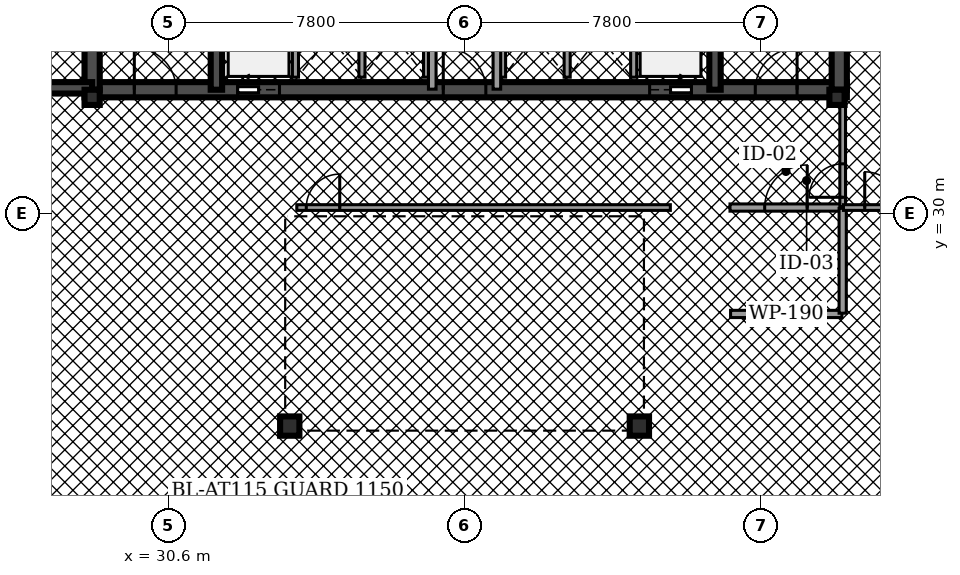
"""IFC4 building model, lengths in metres.
Left out: names, types, materials, properties, quantities, classifications, styles, units other than length and angle.
Written with IfcOpenShell. Run it as: python <this file> out.ifc"""

import sys

from ifc_helpers import new_model, si_unit, direction, frame, frame_2d, origin, origin_2d, place, context, subcontext, project, spatial, rectangle, hollow_rectangle, hollow_circle, extrude, element, fill, save


model = new_model("IFC4")
c1 = context("Model", 3, precision=1e-05, world=origin(), true_north=direction((0.0, 1.0)))
c2 = subcontext(c1, "Body", "Model", "MODEL_VIEW")
j1 = project(units=[si_unit("LENGTHUNIT", "METRE"), si_unit("PLANEANGLEUNIT", "RADIAN")], contexts=[c1])
p1 = place(None, origin())
s1 = spatial("IfcSite", under=j1, at=p1, CompositionType="ELEMENT")
p2 = place(p1, origin())
s2 = spatial("IfcBuilding", under=s1, at=p2, CompositionType="ELEMENT")
p3 = place(p2, frame((0.0, 0.0, 22.78)))
s3 = spatial("IfcBuildingStorey", under=s2, at=p3, CompositionType="ELEMENT", Elevation=22.78)
p4 = place(p3, frame((28.4, 33.25, 0.0), z_axis=(0.0, 0.0, 1.0), x_axis=(1.0, 0.0, 0.0)))
e1 = element("IfcWall", 1, at=p4, inside=s3, PredefinedType="SHEAR", context=c2, shape_type="SweptSolid", body=[
    extrude(rectangle(XDim=20.06, YDim=0.4, at=frame_2d((10.03, 0.0))), origin(), (0.0, 0.0, 1.0), 4.5),
])
p5 = place(p4, frame((4.03, 0.0, 0.0)))
e2 = element("IfcOpeningElement", 2, at=p5, cuts=e1, PredefinedType="OPENING", context=c2, shape_type="SweptSolid", body=[
    extrude(rectangle(XDim=1.1, YDim=2.15, at=frame_2d((0.55, 1.075))), frame((0.0, 0.21, 0.0), z_axis=(0.0, -1.0, 0.0), x_axis=(1.0, 0.0, 0.0)), (0.0, 0.0, 1.0), 0.42),
])
p6 = place(p4, frame((14.87, 0.0, 0.0)))
e3 = element("IfcOpeningElement", 3, at=p6, cuts=e1, PredefinedType="OPENING", context=c2, shape_type="SweptSolid", body=[
    extrude(rectangle(XDim=1.1, YDim=2.15, at=frame_2d((0.55, 1.075))), frame((0.0, 0.21, 0.0), z_axis=(0.0, -1.0, 0.0), x_axis=(1.0, 0.0, 0.0)), (0.0, 0.0, 1.0), 0.42),
])
p7 = place(p4, frame((1.31, 0.0, 0.0)))
e4 = element("IfcOpeningElement", 4, at=p7, cuts=e1, PredefinedType="OPENING", context=c2, shape_type="SweptSolid", body=[
    extrude(rectangle(XDim=1.1, YDim=2.2, at=frame_2d((0.55, 1.1))), frame((0.0, 0.21, 0.0), z_axis=(0.0, -1.0, 0.0), x_axis=(1.0, 0.0, 0.0)), (0.0, 0.0, 1.0), 0.42),
])
p8 = place(p4, frame((9.44, 0.0, 0.0)))
e5 = element("IfcOpeningElement", 5, at=p8, cuts=e1, PredefinedType="OPENING", context=c2, shape_type="SweptSolid", body=[
    extrude(rectangle(XDim=1.12, YDim=2.05, at=frame_2d((0.56, 1.025))), frame((0.0, 0.21, 0.0), z_axis=(0.0, -1.0, 0.0), x_axis=(1.0, 0.0, 0.0)), (0.0, 0.0, 1.0), 0.42),
])
p9 = place(p4, frame((17.65, 0.0, 0.0)))
e6 = element("IfcOpeningElement", 6, at=p9, cuts=e1, PredefinedType="OPENING", context=c2, shape_type="SweptSolid", body=[
    extrude(rectangle(XDim=1.1, YDim=2.2, at=frame_2d((0.55, 1.1))), frame((0.0, 0.21, 0.0), z_axis=(0.0, -1.0, 0.0), x_axis=(1.0, 0.0, 0.0)), (0.0, 0.0, 1.0), 0.42),
])
p10 = place(p3, frame((28.6, 33.25, 0.0), z_axis=(0.0, 0.0, 1.0), x_axis=(0.0, 1.0, 0.0)))
e7 = element("IfcWall", 7, at=p10, inside=s3, PredefinedType="SHEAR", context=c2, shape_type="SweptSolid", body=[
    extrude(rectangle(XDim=10.2, YDim=0.4, at=frame_2d((5.1, 0.0))), origin(), (0.0, 0.0, 1.0), 4.5),
])
for number, where, z_axis, x_axis in (
    (8, (31.87, 33.25, 0.0), (0.0, 0.0, 1.0), (0.0, 1.0, 0.0)),
    (9, (44.99, 33.25, 0.0), (0.0, 0.0, 1.0), (0.0, 1.0, 0.0)),
):
    element("IfcWall", number, at=place(p3, frame(where, z_axis=z_axis, x_axis=x_axis)), inside=s3, PredefinedType="SHEAR", context=c2, shape_type="SweptSolid", body=[
        extrude(rectangle(XDim=10.2, YDim=0.3, at=frame_2d((5.1, 0.0))), origin(), (0.0, 0.0, 1.0), 4.5),
    ])
p11 = place(p3, frame((48.26, 33.25, 0.0), z_axis=(0.0, 0.0, 1.0), x_axis=(0.0, 1.0, 0.0)))
e10 = element("IfcWall", 10, at=p11, inside=s3, PredefinedType="SHEAR", context=c2, shape_type="SweptSolid", body=[
    extrude(rectangle(XDim=10.2, YDim=0.4, at=frame_2d((5.1, 0.0))), origin(), (0.0, 0.0, 1.0), 4.5),
])
p12 = place(p3, frame((25.08, 33.3, 0.0), z_axis=(0.0, 0.0, 1.0), x_axis=(1.0, 0.0, 0.0)))
e11 = element("IfcWall", 11, at=p12, inside=s3, PredefinedType="SHEAR", context=c2, shape_type="SweptSolid", body=[
    extrude(rectangle(XDim=3.52, YDim=0.3, at=frame_2d((1.76, 0.0))), origin(), (0.0, 0.0, 1.0), 4.5),
])
p13 = place(p12, frame((1.335, 0.0, 0.0)))
e12 = element("IfcOpeningElement", 12, at=p13, cuts=e11, PredefinedType="OPENING", context=c2, shape_type="SweptSolid", body=[
    extrude(rectangle(XDim=0.95, YDim=2.2, at=frame_2d((0.475, 1.1))), frame((0.0, 0.16, 0.0), z_axis=(0.0, -1.0, 0.0), x_axis=(1.0, 0.0, 0.0)), (0.0, 0.0, 1.0), 0.32),
])
for number, where, z_axis, x_axis in (
    (13, (28.6, 33.05, 0.0), (0.0, 0.0, 1.0), (1.0, 0.0, 0.0)),
    (14, (48.2, 33.05, 0.0), (0.0, 0.0, 1.0), (1.0, 0.0, 0.0)),
):
    element("IfcColumn", number, at=place(p3, frame(where, z_axis=z_axis, x_axis=x_axis)), inside=s3, PredefinedType="PILASTER", context=c2, shape_type="SweptSolid", body=[
        extrude(hollow_rectangle(XDim=0.4, YDim=0.4, WallThickness=0.02, at=origin_2d()), origin(), (0.0, 0.0, 1.0), 4.5),
    ])
for number, where, z_axis, x_axis in (
    (15, (33.8, 24.4, 0.0), (0.0, 0.0, 1.0), (1.0, 0.0, 0.0)),
    (16, (43.0, 24.4, 0.0), (0.0, 0.0, 1.0), (1.0, 0.0, 0.0)),
):
    element("IfcColumn", number, at=place(p3, frame(where, z_axis=z_axis, x_axis=x_axis)), inside=s3, PredefinedType="COLUMN", context=c2, shape_type="SweptSolid", body=[
        extrude(hollow_circle(Radius=0.254, WallThickness=0.02, at=origin_2d()), origin(), (0.0, 0.0, 1.0), 4.5),
    ])
p14 = place(p3, frame((16.0, 33.568, 0.0), z_axis=(0.0, 0.0, 1.0), x_axis=(0.603864446157, 0.797087028289, 0.0)))
e17 = element("IfcWall", 17, at=p14, inside=s3, PredefinedType="STANDARD", context=c2, shape_type="SweptSolid", body=[
    extrude(rectangle(XDim=20.866, YDim=0.26, at=frame_2d((10.433, 0.0))), origin(), (0.0, 0.0, 1.0), 3.65),
])
p15 = place(p14, frame((2.65, 0.0, 0.0)))
e18 = element("IfcOpeningElement", 18, at=p15, cuts=e17, PredefinedType="OPENING", context=c2, shape_type="SweptSolid", body=[
    extrude(rectangle(XDim=1.8, YDim=2.2, at=frame_2d((0.9, 1.1))), frame((0.0, 0.14, 0.0), z_axis=(0.0, -1.0, 0.0), x_axis=(1.0, 0.0, 0.0)), (0.0, 0.0, 1.0), 0.28),
])
p16 = place(p14, frame((5.3, 0.0, 0.75)))
e19 = element("IfcOpeningElement", 19, at=p16, cuts=e17, PredefinedType="OPENING", context=c2, shape_type="SweptSolid", body=[
    extrude(rectangle(XDim=2.1, YDim=2.2, at=frame_2d((1.05, 1.1))), frame((0.0, 0.14, 0.0), z_axis=(0.0, -1.0, 0.0), x_axis=(1.0, 0.0, 0.0)), (0.0, 0.0, 1.0), 0.28),
])
for number, where, z_axis, x_axis in (
    (20, (33.95, 33.58, 0.0), (0.0, 0.0, 1.0), (0.0, 1.0, 0.0)),
    (21, (42.85, 33.58, 0.0), (0.0, 0.0, 1.0), (0.0, 1.0, 0.0)),
):
    element("IfcWall", number, at=place(p3, frame(where, z_axis=z_axis, x_axis=x_axis)), inside=s3, PredefinedType="SOLIDWALL", context=c2, shape_type="SweptSolid", body=[
        extrude(rectangle(XDim=2.45, YDim=0.16, at=frame_2d((1.225, 0.0))), origin(), (0.0, 0.0, 1.0), 3.472),
    ])
for number, where, z_axis, x_axis in (
    (22, (35.7, 33.58, 0.0), (0.0, 0.0, 1.0), (0.0, 1.0, 0.0)),
    (23, (37.4, 33.58, 0.0), (0.0, 0.0, 1.0), (0.0, 1.0, 0.0)),
    (24, (39.4, 33.58, 0.0), (0.0, 0.0, 1.0), (0.0, 1.0, 0.0)),
    (25, (41.1, 33.58, 0.0), (0.0, 0.0, 1.0), (0.0, 1.0, 0.0)),
):
    element("IfcWall", number, at=place(p3, frame(where, z_axis=z_axis, x_axis=x_axis)), inside=s3, PredefinedType="SOLIDWALL", context=c2, shape_type="SweptSolid", body=[
        extrude(rectangle(XDim=2.25, YDim=0.16, at=frame_2d((1.125, 0.0))), origin(), (0.0, 0.0, 1.0), 3.472),
    ])
p17 = place(p3, frame((37.55, 33.265, 0.0), z_axis=(0.0, 0.0, 1.0), x_axis=(0.0, 1.0, 0.0)))
e26 = element("IfcWall", 26, at=p17, inside=s3, PredefinedType="PARTITIONING", context=c2, shape_type="SweptSolid", body=[
    extrude(rectangle(XDim=4.265, YDim=0.2, at=frame_2d((2.133, 0.0))), origin(), (0.0, 0.0, 1.0), 3.457),
])
p18 = place(p17, frame((3.093, 0.0, 0.0)))
e27 = element("IfcOpeningElement", 27, at=p18, cuts=e26, PredefinedType="OPENING", context=c2, shape_type="SweptSolid", body=[
    extrude(rectangle(XDim=0.88, YDim=2.05, at=frame_2d((0.44, 1.025))), frame((0.0, 0.11, 0.0), z_axis=(0.0, -1.0, 0.0), x_axis=(1.0, 0.0, 0.0)), (0.0, 0.0, 1.0), 0.22),
])
p19 = place(p3, frame((39.25, 33.265, 0.0), z_axis=(0.0, 0.0, 1.0), x_axis=(0.0, 1.0, 0.0)))
e28 = element("IfcWall", 28, at=p19, inside=s3, PredefinedType="PARTITIONING", context=c2, shape_type="SweptSolid", body=[
    extrude(rectangle(XDim=4.265, YDim=0.2, at=frame_2d((2.133, 0.0))), origin(), (0.0, 0.0, 1.0), 3.457),
])
p20 = place(p19, frame((3.093, 0.0, 0.0)))
e29 = element("IfcOpeningElement", 29, at=p20, cuts=e28, PredefinedType="OPENING", context=c2, shape_type="SweptSolid", body=[
    extrude(rectangle(XDim=0.88, YDim=2.05, at=frame_2d((0.44, 1.025))), frame((0.0, 0.11, 0.0), z_axis=(0.0, -1.0, 0.0), x_axis=(1.0, 0.0, 0.0)), (0.0, 0.0, 1.0), 0.22),
])
p21 = place(p3, frame((45.385, 30.15, 0.0), z_axis=(0.0, 0.0, 1.0), x_axis=(1.0, 0.0, 0.0)))
e30 = element("IfcWall", 30, at=p21, inside=s3, PredefinedType="PARTITIONING", context=c2, shape_type="SweptSolid", body=[
    extrude(rectangle(XDim=2.945, YDim=0.19, at=frame_2d((1.473, 0.0))), origin(), (0.0, 0.0, 1.0), 3.457),
])
p22 = place(p21, frame((0.913, 0.0, 0.0)))
e31 = element("IfcOpeningElement", 31, at=p22, cuts=e30, PredefinedType="OPENING", context=c2, shape_type="SweptSolid", body=[
    extrude(rectangle(XDim=1.12, YDim=2.05, at=frame_2d((0.56, 1.025))), frame((0.0, 0.105, 0.0), z_axis=(0.0, -1.0, 0.0), x_axis=(1.0, 0.0, 0.0)), (0.0, 0.0, 1.0), 0.21),
])
p23 = place(p3, frame((48.35, 30.17, 0.0), z_axis=(0.0, 0.0, 1.0), x_axis=(0.0, 1.0, 0.0)))
e32 = element("IfcWall", 32, at=p23, inside=s3, PredefinedType="PARTITIONING", context=c2, shape_type="SweptSolid", body=[
    extrude(rectangle(XDim=2.975, YDim=0.15, at=frame_2d((1.488, 0.0))), origin(), (0.0, 0.0, 1.0), 3.457),
])
p24 = place(p23, frame((0.25, 0.0, 0.0)))
e33 = element("IfcOpeningElement", 33, at=p24, cuts=e32, PredefinedType="OPENING", context=c2, shape_type="SweptSolid", body=[
    extrude(rectangle(XDim=0.88, YDim=2.05, at=frame_2d((0.44, 1.025))), frame((0.0, 0.085, 0.0), z_axis=(0.0, -1.0, 0.0), x_axis=(1.0, 0.0, 0.0)), (0.0, 0.0, 1.0), 0.17),
])
p25 = place(p3, frame((33.985, 30.15, 0.0), z_axis=(0.0, 0.0, 1.0), x_axis=(1.0, 0.0, 0.0)))
e34 = element("IfcWall", 34, at=p25, inside=s3, PredefinedType="PARTITIONING", context=c2, shape_type="SweptSolid", body=[
    extrude(rectangle(XDim=9.83, YDim=0.15, at=frame_2d((4.915, 0.0))), origin(), (0.0, 0.0, 1.0), 3.457),
])
p26 = place(p25, frame((0.25, 0.0, 0.0)))
e35 = element("IfcOpeningElement", 35, at=p26, cuts=e34, PredefinedType="OPENING", context=c2, shape_type="SweptSolid", body=[
    extrude(rectangle(XDim=0.88, YDim=2.05, at=frame_2d((0.44, 1.025))), frame((0.0, 0.085, 0.0), z_axis=(0.0, -1.0, 0.0), x_axis=(1.0, 0.0, 0.0)), (0.0, 0.0, 1.0), 0.17),
])
p27 = place(p3, frame((45.4, 27.35, 0.0), z_axis=(0.0, 0.0, 1.0), x_axis=(1.0, 0.0, 0.0)))
e36 = element("IfcWall", 36, at=p27, inside=s3, PredefinedType="PARTITIONING", context=c2, shape_type="SweptSolid", body=[
    extrude(rectangle(XDim=2.93, YDim=0.19, at=frame_2d((1.465, 0.0))), origin(), (0.0, 0.0, 1.0), 3.457),
])
p28 = place(p3, frame((48.35, 27.37, 0.0), z_axis=(0.0, 0.0, 1.0), x_axis=(0.0, 1.0, 0.0)))
e37 = element("IfcWall", 37, at=p28, inside=s3, PredefinedType="PARTITIONING", context=c2, shape_type="SweptSolid", body=[
    extrude(rectangle(XDim=2.76, YDim=0.19, at=frame_2d((1.38, 0.0))), origin(), (0.0, 0.0, 1.0), 3.457),
])
p29 = place(p3, frame((48.37, 30.15, 0.0), z_axis=(0.0, 0.0, 1.0), x_axis=(1.0, 0.0, 0.0)))
e38 = element("IfcWall", 38, at=p29, inside=s3, PredefinedType="PARTITIONING", context=c2, shape_type="SweptSolid", body=[
    extrude(rectangle(XDim=2.06, YDim=0.15, at=frame_2d((1.03, 0.0))), origin(), (0.0, 0.0, 1.0), 3.457),
])
p30 = place(p29, frame((0.56, 0.0, 0.0)))
e39 = element("IfcOpeningElement", 39, at=p30, cuts=e38, PredefinedType="OPENING", context=c2, shape_type="SweptSolid", body=[
    extrude(rectangle(XDim=0.94, YDim=2.05, at=frame_2d((0.47, 1.025))), frame((0.0, 0.085, 0.0), z_axis=(0.0, -1.0, 0.0), x_axis=(1.0, 0.0, 0.0)), (0.0, 0.0, 1.0), 0.17),
])
p31 = place(p5, origin())
e40 = element("IfcDoor", 40, at=p31, inside=s3, OperationType="SLIDING_TO_LEFT", PredefinedType="DOOR", context=c2, shape_type="SweptSolid", body=[
    extrude(rectangle(XDim=1.1, YDim=2.15, at=frame_2d((0.55, 1.075))), frame((0.0, 0.025, 0.0), z_axis=(0.0, -1.0, 0.0), x_axis=(1.0, 0.0, 0.0)), (0.0, 0.0, 1.0), 0.05),
])
fill(e2, e40)
p32 = place(p6, origin())
e41 = element("IfcDoor", 41, at=p32, inside=s3, OperationType="SLIDING_TO_RIGHT", PredefinedType="DOOR", context=c2, shape_type="SweptSolid", body=[
    extrude(rectangle(XDim=1.1, YDim=2.15, at=frame_2d((0.55, 1.075))), frame((0.0, 0.025, 0.0), z_axis=(0.0, -1.0, 0.0), x_axis=(1.0, 0.0, 0.0)), (0.0, 0.0, 1.0), 0.05),
])
fill(e3, e41)
p33 = place(p7, origin())
e42 = element("IfcDoor", 42, at=p33, inside=s3, OperationType="SINGLE_SWING_LEFT", PredefinedType="DOOR", context=c2, shape_type="SweptSolid", body=[
    extrude(rectangle(XDim=1.1, YDim=2.2, at=frame_2d((0.55, 1.1))), frame((0.0, 0.025, 0.0), z_axis=(0.0, -1.0, 0.0), x_axis=(1.0, 0.0, 0.0)), (0.0, 0.0, 1.0), 0.05),
])
fill(e4, e42)
p34 = place(p8, origin())
e43 = element("IfcDoor", 43, at=p34, inside=s3, OperationType="SINGLE_SWING_LEFT", PredefinedType="DOOR", context=c2, shape_type="SweptSolid", body=[
    extrude(rectangle(XDim=1.12, YDim=2.05, at=frame_2d((0.56, 1.025))), frame((0.0, 0.025, 0.0), z_axis=(0.0, -1.0, 0.0), x_axis=(1.0, 0.0, 0.0)), (0.0, 0.0, 1.0), 0.05),
])
fill(e5, e43)
p35 = place(p9, origin())
e44 = element("IfcDoor", 44, at=p35, inside=s3, OperationType="SINGLE_SWING_RIGHT", PredefinedType="DOOR", context=c2, shape_type="SweptSolid", body=[
    extrude(rectangle(XDim=1.1, YDim=2.2, at=frame_2d((0.55, 1.1))), frame((0.0, 0.025, 0.0), z_axis=(0.0, -1.0, 0.0), x_axis=(1.0, 0.0, 0.0)), (0.0, 0.0, 1.0), 0.05),
])
fill(e6, e44)
p36 = place(p22, origin())
e45 = element("IfcDoor", 45, at=p36, inside=s3, OperationType="SINGLE_SWING_RIGHT", PredefinedType="DOOR", context=c2, shape_type="SweptSolid", body=[
    extrude(rectangle(XDim=1.12, YDim=2.05, at=frame_2d((0.56, 1.025))), frame((0.0, 0.025, 0.0), z_axis=(0.0, -1.0, 0.0), x_axis=(1.0, 0.0, 0.0)), (0.0, 0.0, 1.0), 0.05),
])
fill(e31, e45)
p37 = place(p24, origin())
e46 = element("IfcDoor", 46, at=p37, inside=s3, OperationType="SINGLE_SWING_LEFT", PredefinedType="DOOR", context=c2, shape_type="SweptSolid", body=[
    extrude(rectangle(XDim=0.88, YDim=2.05, at=frame_2d((0.44, 1.025))), frame((0.0, 0.025, 0.0), z_axis=(0.0, -1.0, 0.0), x_axis=(1.0, 0.0, 0.0)), (0.0, 0.0, 1.0), 0.05),
])
fill(e33, e46)
p38 = place(p26, origin())
e47 = element("IfcDoor", 47, at=p38, inside=s3, OperationType="SINGLE_SWING_RIGHT", PredefinedType="DOOR", context=c2, shape_type="SweptSolid", body=[
    extrude(rectangle(XDim=0.88, YDim=2.05, at=frame_2d((0.44, 1.025))), frame((0.0, 0.025, 0.0), z_axis=(0.0, -1.0, 0.0), x_axis=(1.0, 0.0, 0.0)), (0.0, 0.0, 1.0), 0.05),
])
fill(e35, e47)
p39 = place(p30, origin())
e48 = element("IfcDoor", 48, at=p39, inside=s3, OperationType="SINGLE_SWING_LEFT", PredefinedType="DOOR", context=c2, shape_type="SweptSolid", body=[
    extrude(rectangle(XDim=0.94, YDim=2.05, at=frame_2d((0.47, 1.025))), frame((0.0, 0.025, 0.0), z_axis=(0.0, -1.0, 0.0), x_axis=(1.0, 0.0, 0.0)), (0.0, 0.0, 1.0), 0.05),
])
fill(e39, e48)
save(model, sys.argv[1])
